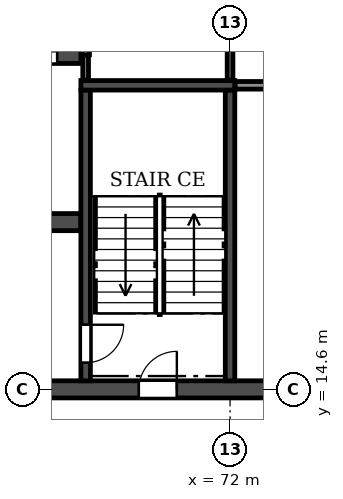
"""IFC4 building model, lengths in metres.
Left out: names, types, materials, properties, quantities, classifications, styles, units other than length and angle.
Written with IfcOpenShell. Run it as: python <this file> out.ifc"""

import sys

from ifc_helpers import new_model, si_unit, direction, frame, frame_2d, origin, place, context, subcontext, project, spatial, rectangle, extrude, element, fill, save


model = new_model("IFC4")
c1 = context("Model", 3, precision=1e-05, world=origin(), true_north=direction((0.0, 1.0)))
c2 = subcontext(c1, "Body", "Model", "MODEL_VIEW")
j1 = project(units=[si_unit("LENGTHUNIT", "METRE"), si_unit("PLANEANGLEUNIT", "RADIAN")], contexts=[c1])
p1 = place(None, origin())
s1 = spatial("IfcSite", under=j1, at=p1, CompositionType="ELEMENT")
p2 = place(p1, origin())
s2 = spatial("IfcBuilding", under=s1, at=p2, CompositionType="ELEMENT")
p3 = place(p2, frame((0.0, 0.0, 19.2)))
s3 = spatial("IfcBuildingStorey", under=s2, at=p3, CompositionType="ELEMENT", Elevation=19.2)
p4 = place(p3, frame((18.0, 14.6, 0.0), z_axis=(0.0, 0.0, 1.0), x_axis=(1.0, 0.0, 0.0)))
e1 = element("IfcWall", 1, at=p4, inside=s3, PredefinedType="SOLIDWALL", context=c2, shape_type="SweptSolid", body=[
    extrude(rectangle(XDim=66.0, YDim=0.45, at=frame_2d((33.0, 0.0))), origin(), (0.0, 0.0, 1.0), 3.95),
])
p5 = place(p4, frame((0.9, 0.0, 0.0)))
e2 = element("IfcOpeningElement", 2, at=p5, cuts=e1, PredefinedType="OPENING", context=c2, shape_type="SweptSolid", body=[
    extrude(rectangle(XDim=1.0, YDim=2.1, at=frame_2d((0.5, 1.05))), frame((0.0, 0.235, 0.0), z_axis=(0.0, -1.0, 0.0), x_axis=(1.0, 0.0, 0.0)), (0.0, 0.0, 1.0), 0.47),
])
p6 = place(p4, frame((8.8, 0.0, 0.0)))
e3 = element("IfcOpeningElement", 3, at=p6, cuts=e1, PredefinedType="OPENING", context=c2, shape_type="SweptSolid", body=[
    extrude(rectangle(XDim=1.0, YDim=2.1, at=frame_2d((0.5, 1.05))), frame((0.0, 0.235, 0.0), z_axis=(0.0, -1.0, 0.0), x_axis=(1.0, 0.0, 0.0)), (0.0, 0.0, 1.0), 0.47),
])
p7 = place(p4, frame((13.4, 0.0, 0.0)))
e4 = element("IfcOpeningElement", 4, at=p7, cuts=e1, PredefinedType="OPENING", context=c2, shape_type="SweptSolid", body=[
    extrude(rectangle(XDim=1.0, YDim=2.1, at=frame_2d((0.5, 1.05))), frame((0.0, 0.235, 0.0), z_axis=(0.0, -1.0, 0.0), x_axis=(1.0, 0.0, 0.0)), (0.0, 0.0, 1.0), 0.47),
])
p8 = place(p4, frame((27.3, 0.0, 0.0)))
e5 = element("IfcOpeningElement", 5, at=p8, cuts=e1, PredefinedType="OPENING", context=c2, shape_type="SweptSolid", body=[
    extrude(rectangle(XDim=1.0, YDim=2.1, at=frame_2d((0.5, 1.05))), frame((0.0, 0.235, 0.0), z_axis=(0.0, -1.0, 0.0), x_axis=(1.0, 0.0, 0.0)), (0.0, 0.0, 1.0), 0.47),
])
p9 = place(p4, frame((32.5, 0.0, 0.0)))
e6 = element("IfcOpeningElement", 6, at=p9, cuts=e1, PredefinedType="OPENING", context=c2, shape_type="SweptSolid", body=[
    extrude(rectangle(XDim=1.0, YDim=2.1, at=frame_2d((0.5, 1.05))), frame((0.0, 0.235, 0.0), z_axis=(0.0, -1.0, 0.0), x_axis=(1.0, 0.0, 0.0)), (0.0, 0.0, 1.0), 0.47),
])
p10 = place(p4, frame((35.1, 0.0, 0.0)))
e7 = element("IfcOpeningElement", 7, at=p10, cuts=e1, PredefinedType="OPENING", context=c2, shape_type="SweptSolid", body=[
    extrude(rectangle(XDim=1.0, YDim=2.1, at=frame_2d((0.5, 1.05))), frame((0.0, 0.235, 0.0), z_axis=(0.0, -1.0, 0.0), x_axis=(1.0, 0.0, 0.0)), (0.0, 0.0, 1.0), 0.47),
])
p11 = place(p4, frame((39.0, 0.0, 0.0)))
e8 = element("IfcOpeningElement", 8, at=p11, cuts=e1, PredefinedType="OPENING", context=c2, shape_type="SweptSolid", body=[
    extrude(rectangle(XDim=1.0, YDim=2.1, at=frame_2d((0.5, 1.05))), frame((0.0, 0.235, 0.0), z_axis=(0.0, -1.0, 0.0), x_axis=(1.0, 0.0, 0.0)), (0.0, 0.0, 1.0), 0.47),
])
p12 = place(p4, frame((51.6, 0.0, 0.0)))
e9 = element("IfcOpeningElement", 9, at=p12, cuts=e1, PredefinedType="OPENING", context=c2, shape_type="SweptSolid", body=[
    extrude(rectangle(XDim=1.0, YDim=2.1, at=frame_2d((0.5, 1.05))), frame((0.0, 0.235, 0.0), z_axis=(0.0, -1.0, 0.0), x_axis=(1.0, 0.0, 0.0)), (0.0, 0.0, 1.0), 0.47),
])
p13 = place(p4, frame((56.25, 0.0, 0.0)))
e10 = element("IfcOpeningElement", 10, at=p13, cuts=e1, PredefinedType="OPENING", context=c2, shape_type="SweptSolid", body=[
    extrude(rectangle(XDim=0.9, YDim=2.1, at=frame_2d((0.45, 1.05))), frame((0.0, 0.235, 0.0), z_axis=(0.0, -1.0, 0.0), x_axis=(1.0, 0.0, 0.0)), (0.0, 0.0, 1.0), 0.47),
])
p14 = place(p4, frame((64.1, 0.0, 0.0)))
e11 = element("IfcOpeningElement", 11, at=p14, cuts=e1, PredefinedType="OPENING", context=c2, shape_type="SweptSolid", body=[
    extrude(rectangle(XDim=1.0, YDim=2.1, at=frame_2d((0.5, 1.05))), frame((0.0, 0.235, 0.0), z_axis=(0.0, -1.0, 0.0), x_axis=(1.0, 0.0, 0.0)), (0.0, 0.0, 1.0), 0.47),
])
p15 = place(p3, frame((33.925, 19.0, 0.0), z_axis=(0.0, 0.0, 1.0), x_axis=(1.0, 0.0, 0.0)))
e12 = element("IfcWall", 12, at=p15, inside=s3, PredefinedType="SOLIDWALL", context=c2, shape_type="SweptSolid", body=[
    extrude(rectangle(XDim=34.15, YDim=0.45, at=frame_2d((17.075, 0.0))), origin(), (0.0, 0.0, 1.0), 3.95),
])
p16 = place(p15, frame((16.175, 0.0, 0.0)))
e13 = element("IfcOpeningElement", 13, at=p16, cuts=e12, PredefinedType="OPENING", context=c2, shape_type="SweptSolid", body=[
    extrude(rectangle(XDim=1.8, YDim=2.1, at=frame_2d((0.9, 1.05))), frame((0.0, 0.235, 0.0), z_axis=(0.0, -1.0, 0.0), x_axis=(1.0, 0.0, 0.0)), (0.0, 0.0, 1.0), 0.47),
])
p17 = place(p15, frame((1.525, 0.0, 0.0)))
e14 = element("IfcOpeningElement", 14, at=p17, cuts=e12, PredefinedType="OPENING", context=c2, shape_type="SweptSolid", body=[
    extrude(rectangle(XDim=1.8, YDim=2.1, at=frame_2d((0.9, 1.05))), frame((0.0, 0.235, 0.0), z_axis=(0.0, -1.0, 0.0), x_axis=(1.0, 0.0, 0.0)), (0.0, 0.0, 1.0), 0.47),
])
p18 = place(p15, frame((8.725, 0.0, 0.0)))
e15 = element("IfcOpeningElement", 15, at=p18, cuts=e12, PredefinedType="OPENING", context=c2, shape_type="SweptSolid", body=[
    extrude(rectangle(XDim=1.1, YDim=2.1, at=frame_2d((0.55, 1.05))), frame((0.0, 0.235, 0.0), z_axis=(0.0, -1.0, 0.0), x_axis=(1.0, 0.0, 0.0)), (0.0, 0.0, 1.0), 0.47),
])
p19 = place(p15, frame((11.325, 0.0, 0.0)))
e16 = element("IfcOpeningElement", 16, at=p19, cuts=e12, PredefinedType="OPENING", context=c2, shape_type="SweptSolid", body=[
    extrude(rectangle(XDim=1.1, YDim=2.1, at=frame_2d((0.55, 1.05))), frame((0.0, 0.235, 0.0), z_axis=(0.0, -1.0, 0.0), x_axis=(1.0, 0.0, 0.0)), (0.0, 0.0, 1.0), 0.47),
])
p20 = place(p15, frame((13.925, 0.0, 0.0)))
e17 = element("IfcOpeningElement", 17, at=p20, cuts=e12, PredefinedType="OPENING", context=c2, shape_type="SweptSolid", body=[
    extrude(rectangle(XDim=1.1, YDim=2.1, at=frame_2d((0.55, 1.05))), frame((0.0, 0.235, 0.0), z_axis=(0.0, -1.0, 0.0), x_axis=(1.0, 0.0, 0.0)), (0.0, 0.0, 1.0), 0.47),
])
p21 = place(p15, frame((19.125, 0.0, 0.0)))
e18 = element("IfcOpeningElement", 18, at=p21, cuts=e12, PredefinedType="OPENING", context=c2, shape_type="SweptSolid", body=[
    extrude(rectangle(XDim=1.1, YDim=2.1, at=frame_2d((0.55, 1.05))), frame((0.0, 0.235, 0.0), z_axis=(0.0, -1.0, 0.0), x_axis=(1.0, 0.0, 0.0)), (0.0, 0.0, 1.0), 0.47),
])
p22 = place(p15, frame((21.725, 0.0, 0.0)))
e19 = element("IfcOpeningElement", 19, at=p22, cuts=e12, PredefinedType="OPENING", context=c2, shape_type="SweptSolid", body=[
    extrude(rectangle(XDim=1.1, YDim=2.1, at=frame_2d((0.55, 1.05))), frame((0.0, 0.235, 0.0), z_axis=(0.0, -1.0, 0.0), x_axis=(1.0, 0.0, 0.0)), (0.0, 0.0, 1.0), 0.47),
])
p23 = place(p15, frame((24.325, 0.0, 0.0)))
e20 = element("IfcOpeningElement", 20, at=p23, cuts=e12, PredefinedType="OPENING", context=c2, shape_type="SweptSolid", body=[
    extrude(rectangle(XDim=1.1, YDim=2.1, at=frame_2d((0.55, 1.05))), frame((0.0, 0.235, 0.0), z_axis=(0.0, -1.0, 0.0), x_axis=(1.0, 0.0, 0.0)), (0.0, 0.0, 1.0), 0.47),
])
p24 = place(p15, frame((30.825, 0.0, 0.0)))
e21 = element("IfcOpeningElement", 21, at=p24, cuts=e12, PredefinedType="OPENING", context=c2, shape_type="SweptSolid", body=[
    extrude(rectangle(XDim=1.8, YDim=2.1, at=frame_2d((0.9, 1.05))), frame((0.0, 0.235, 0.0), z_axis=(0.0, -1.0, 0.0), x_axis=(1.0, 0.0, 0.0)), (0.0, 0.0, 1.0), 0.47),
])
p25 = place(p3, frame((33.925, 23.4, 0.0), z_axis=(0.0, 0.0, 1.0), x_axis=(1.0, 0.0, 0.0)))
e22 = element("IfcWall", 22, at=p25, inside=s3, PredefinedType="SOLIDWALL", context=c2, shape_type="SweptSolid", body=[
    extrude(rectangle(XDim=34.15, YDim=0.45, at=frame_2d((17.075, 0.0))), origin(), (0.0, 0.0, 1.0), 3.95),
])
p26 = place(p25, frame((16.175, 0.0, 0.0)))
e23 = element("IfcOpeningElement", 23, at=p26, cuts=e22, PredefinedType="OPENING", context=c2, shape_type="SweptSolid", body=[
    extrude(rectangle(XDim=1.8, YDim=2.1, at=frame_2d((0.9, 1.05))), frame((0.0, 0.235, 0.0), z_axis=(0.0, -1.0, 0.0), x_axis=(1.0, 0.0, 0.0)), (0.0, 0.0, 1.0), 0.47),
])
p27 = place(p25, frame((11.025, 0.0, 0.0)))
e24 = element("IfcOpeningElement", 24, at=p27, cuts=e22, PredefinedType="OPENING", context=c2, shape_type="SweptSolid", body=[
    extrude(rectangle(XDim=1.1, YDim=2.1, at=frame_2d((0.55, 1.05))), frame((0.0, 0.235, 0.0), z_axis=(0.0, -1.0, 0.0), x_axis=(1.0, 0.0, 0.0)), (0.0, 0.0, 1.0), 0.47),
])
p28 = place(p25, frame((29.825, 0.0, 0.0)))
e25 = element("IfcOpeningElement", 25, at=p28, cuts=e22, PredefinedType="OPENING", context=c2, shape_type="SweptSolid", body=[
    extrude(rectangle(XDim=1.1, YDim=2.1, at=frame_2d((0.55, 1.05))), frame((0.0, 0.235, 0.0), z_axis=(0.0, -1.0, 0.0), x_axis=(1.0, 0.0, 0.0)), (0.0, 0.0, 1.0), 0.47),
])
p29 = place(p25, frame((32.425, 0.0, 0.0)))
e26 = element("IfcOpeningElement", 26, at=p29, cuts=e22, PredefinedType="OPENING", context=c2, shape_type="SweptSolid", body=[
    extrude(rectangle(XDim=1.1, YDim=2.1, at=frame_2d((0.55, 1.05))), frame((0.0, 0.235, 0.0), z_axis=(0.0, -1.0, 0.0), x_axis=(1.0, 0.0, 0.0)), (0.0, 0.0, 1.0), 0.47),
])
p30 = place(p3, frame((68.2, 14.825, 0.0), z_axis=(0.0, 0.0, 1.0), x_axis=(0.0, 1.0, 0.0)))
e27 = element("IfcWall", 27, at=p30, inside=s3, PredefinedType="SOLIDWALL", context=c2, shape_type="SweptSolid", body=[
    extrude(rectangle(XDim=7.65, YDim=0.25, at=frame_2d((3.825, 0.0))), origin(), (0.0, 0.0, 1.0), 3.95),
])
p31 = place(p30, frame((0.475, 0.0, 0.0)))
e28 = element("IfcOpeningElement", 28, at=p31, cuts=e27, PredefinedType="OPENING", context=c2, shape_type="SweptSolid", body=[
    extrude(rectangle(XDim=1.0, YDim=2.1, at=frame_2d((0.5, 1.05))), frame((0.0, 0.135, 0.0), z_axis=(0.0, -1.0, 0.0), x_axis=(1.0, 0.0, 0.0)), (0.0, 0.0, 1.0), 0.27),
])
p32 = place(p3, frame((72.0, 14.825, 0.0), z_axis=(0.0, 0.0, 1.0), x_axis=(0.0, 1.0, 0.0)))
e29 = element("IfcWall", 29, at=p32, inside=s3, PredefinedType="SOLIDWALL", context=c2, shape_type="SweptSolid", body=[
    extrude(rectangle(XDim=7.65, YDim=0.25, at=frame_2d((3.825, 0.0))), origin(), (0.0, 0.0, 1.0), 3.95),
])
p33 = place(p3, frame((68.075, 22.6, 0.0), z_axis=(0.0, 0.0, 1.0), x_axis=(1.0, 0.0, 0.0)))
e30 = element("IfcWall", 30, at=p33, inside=s3, PredefinedType="SOLIDWALL", context=c2, shape_type="SweptSolid", body=[
    extrude(rectangle(XDim=4.05, YDim=0.25, at=frame_2d((2.025, 0.0))), origin(), (0.0, 0.0, 1.0), 3.95),
])
p34 = place(p3, frame((72.135, 22.6, 0.0), z_axis=(0.0, 0.0, 1.0), x_axis=(1.0, 0.0, 0.0)))
e31 = element("IfcWall", 31, at=p34, inside=s3, PredefinedType="PARTITIONING", context=c2, shape_type="SweptSolid", body=[
    extrude(rectangle(XDim=5.13, YDim=0.2, at=frame_2d((2.565, 0.0))), origin(), (0.0, 0.0, 1.0), 3.95),
])
p35 = place(p3, frame((68.2, 22.735, 0.0), z_axis=(0.0, 0.0, 1.0), x_axis=(0.0, 1.0, 0.0)))
e32 = element("IfcWall", 32, at=p35, inside=s3, PredefinedType="PARTITIONING", context=c2, shape_type="SweptSolid", body=[
    extrude(rectangle(XDim=0.665, YDim=0.15, at=frame_2d((0.333, 0.0))), origin(), (0.0, 0.0, 1.0), 3.95),
])
p36 = place(p3, frame((72.0, 22.735, 0.0), z_axis=(0.0, 0.0, 1.0), x_axis=(0.0, 1.0, 0.0)))
e33 = element("IfcWall", 33, at=p36, inside=s3, PredefinedType="PARTITIONING", context=c2, shape_type="SweptSolid", body=[
    extrude(rectangle(XDim=4.83, YDim=0.15, at=frame_2d((2.415, 0.0))), origin(), (0.0, 0.0, 1.0), 3.95),
])
p37 = place(p3, frame((68.2, 23.4, 0.0), z_axis=(0.0, 0.0, 1.0), x_axis=(0.0, 1.0, 0.0)))
e34 = element("IfcWall", 34, at=p37, inside=s3, PredefinedType="PARTITIONING", context=c2, shape_type="SweptSolid", body=[
    extrude(rectangle(XDim=2.7, YDim=0.2, at=frame_2d((1.35, 0.0))), origin(), (0.0, 0.0, 1.0), 3.95),
])
p38 = place(p12, origin())
e35 = element("IfcDoor", 35, at=p38, inside=s3, OperationType="SINGLE_SWING_RIGHT", PredefinedType="DOOR", context=c2, shape_type="SweptSolid", body=[
    extrude(rectangle(XDim=1.0, YDim=2.1, at=frame_2d((0.5, 1.05))), frame((0.0, 0.025, 0.0), z_axis=(0.0, -1.0, 0.0), x_axis=(1.0, 0.0, 0.0)), (0.0, 0.0, 1.0), 0.05),
])
fill(e9, e35)
p39 = place(p31, frame((1.0, 0.0, 0.0), z_axis=(0.0, 0.0, 1.0), x_axis=(-1.0, 0.0, 0.0)))
e36 = element("IfcDoor", 36, at=p39, inside=s3, OperationType="SINGLE_SWING_LEFT", PredefinedType="DOOR", context=c2, shape_type="SweptSolid", body=[
    extrude(rectangle(XDim=1.0, YDim=2.1, at=frame_2d((0.5, 1.05))), frame((0.0, 0.025, 0.0), z_axis=(0.0, -1.0, 0.0), x_axis=(1.0, 0.0, 0.0)), (0.0, 0.0, 1.0), 0.05),
])
fill(e28, e36)
p40 = place(p29, origin())
e37 = element("IfcDoor", 37, at=p40, inside=s3, OperationType="DOUBLE_DOOR_SLIDING", PredefinedType="DOOR", context=c2, shape_type="SweptSolid", body=[
    extrude(rectangle(XDim=1.1, YDim=2.1, at=frame_2d((0.55, 1.05))), frame((0.0, 0.025, 0.0), z_axis=(0.0, -1.0, 0.0), x_axis=(1.0, 0.0, 0.0)), (0.0, 0.0, 1.0), 0.05),
])
fill(e26, e37)
save(model, sys.argv[1])
